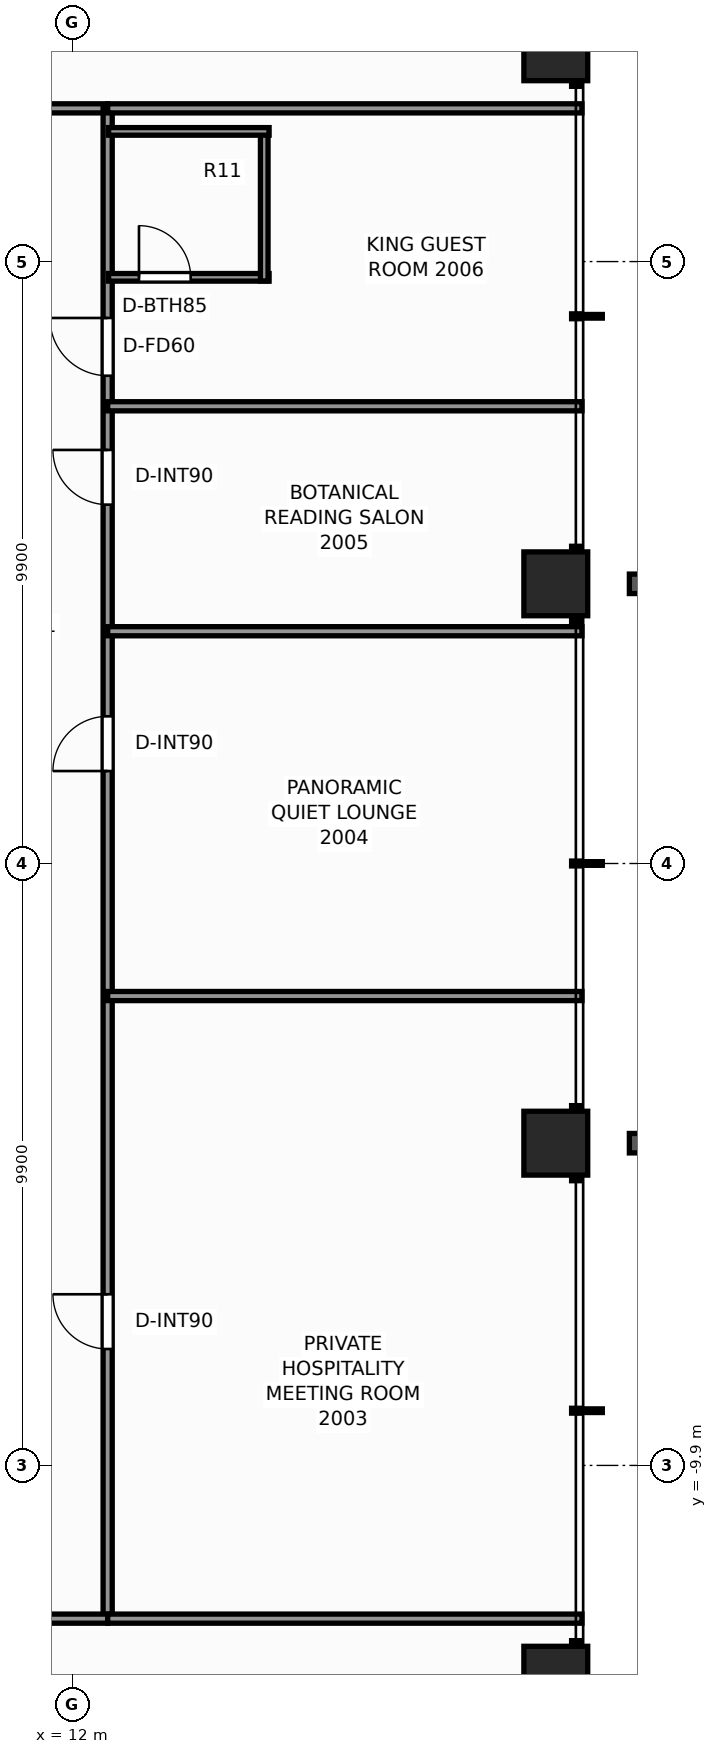
"""IFC4 building model, lengths in metres.
Left out: names, types, materials, properties, quantities, classifications, styles, units other than length and angle.
Written with IfcOpenShell. Run it as: python <this file> out.ifc"""

import sys

from ifc_helpers import new_model, si_unit, direction, frame, frame_2d, origin, origin_2d, place, context, subcontext, project, spatial, rectangle, extrude, element, fill, save


model = new_model("IFC4")
c1 = context("Model", 3, precision=1e-05, world=origin(), true_north=direction((0.0, 1.0)))
c2 = subcontext(c1, "Body", "Model", "MODEL_VIEW")
j1 = project(units=[si_unit("LENGTHUNIT", "METRE"), si_unit("PLANEANGLEUNIT", "RADIAN")], contexts=[c1])
p1 = place(None, origin())
s1 = spatial("IfcSite", under=j1, at=p1, CompositionType="ELEMENT")
p2 = place(p1, origin())
s2 = spatial("IfcBuilding", under=s1, at=p2, CompositionType="ELEMENT")
p3 = place(p2, frame((0.0, 0.0, 72.2)))
s3 = spatial("IfcBuildingStorey", under=s2, at=p3, CompositionType="ELEMENT", Elevation=72.2)
for number, where, z_axis, x_axis in (
    (1, (19.95, -13.4, 0.0), (0.0, 0.0, 1.0), (1.0, 0.0, 0.0)),
    (2, (19.95, -4.6, 0.0), (0.0, 0.0, 1.0), (1.0, 0.0, 0.0)),
    (3, (19.95, 4.6, 0.0), (0.0, 0.0, 1.0), (1.0, 0.0, 0.0)),
    (4, (19.95, 13.4, 0.0), (0.0, 0.0, 1.0), (1.0, 0.0, 0.0)),
):
    element("IfcColumn", number, at=place(p3, frame(where, z_axis=z_axis, x_axis=x_axis)), inside=s3, PredefinedType="COLUMN", context=c2, shape_type="SweptSolid", body=[
        extrude(rectangle(XDim=1.05, YDim=1.05, at=origin_2d()), origin(), (0.0, 0.0, 1.0), 3.3),
    ])
p4 = place(p3, frame((-12.42, 12.42, 0.0), z_axis=(0.0, 0.0, 1.0), x_axis=(1.0, 0.0, 0.0)))
e5 = element("IfcWall", 5, at=p4, inside=s3, PredefinedType="PARTITIONING", context=c2, shape_type="SweptSolid", body=[
    extrude(rectangle(XDim=25.0, YDim=0.15, at=frame_2d((12.5, 0.0))), origin(), (0.0, 0.0, 1.0), 2.292),
])
p5 = place(p4, frame((4.435, 0.0, 0.0)))
e6 = element("IfcOpeningElement", 6, at=p5, cuts=e5, PredefinedType="OPENING", context=c2, shape_type="SweptSolid", body=[
    extrude(rectangle(XDim=0.9, YDim=2.06, at=frame_2d((0.45, 1.03))), frame((0.0, 0.085, 0.0), z_axis=(0.0, -1.0, 0.0), x_axis=(1.0, 0.0, 0.0)), (0.0, 0.0, 1.0), 0.17),
])
p6 = place(p4, frame((19.505, 0.0, 0.0)))
e7 = element("IfcOpeningElement", 7, at=p6, cuts=e5, PredefinedType="OPENING", context=c2, shape_type="SweptSolid", body=[
    extrude(rectangle(XDim=0.9, YDim=2.06, at=frame_2d((0.45, 1.03))), frame((0.0, 0.085, 0.0), z_axis=(0.0, -1.0, 0.0), x_axis=(1.0, 0.0, 0.0)), (0.0, 0.0, 1.0), 0.17),
])
p7 = place(p3, frame((12.58, -12.42, 0.0), z_axis=(0.0, 0.0, 1.0), x_axis=(0.0, 1.0, 0.0)))
e8 = element("IfcWall", 8, at=p7, inside=s3, PredefinedType="PARTITIONING", context=c2, shape_type="SweptSolid", body=[
    extrude(rectangle(XDim=24.84, YDim=0.15, at=frame_2d((12.42, 0.0))), origin(), (0.0, 0.0, 1.0), 2.292),
])
p8 = place(p7, frame((4.435, 0.0, 0.0)))
e9 = element("IfcOpeningElement", 9, at=p8, cuts=e8, PredefinedType="OPENING", context=c2, shape_type="SweptSolid", body=[
    extrude(rectangle(XDim=0.9, YDim=2.06, at=frame_2d((0.45, 1.03))), frame((0.0, 0.085, 0.0), z_axis=(0.0, -1.0, 0.0), x_axis=(1.0, 0.0, 0.0)), (0.0, 0.0, 1.0), 0.17),
])
p9 = place(p7, frame((13.941, 0.0, 0.0)))
e10 = element("IfcOpeningElement", 10, at=p9, cuts=e8, PredefinedType="OPENING", context=c2, shape_type="SweptSolid", body=[
    extrude(rectangle(XDim=0.9, YDim=2.06, at=frame_2d((0.45, 1.03))), frame((0.0, 0.085, 0.0), z_axis=(0.0, -1.0, 0.0), x_axis=(1.0, 0.0, 0.0)), (0.0, 0.0, 1.0), 0.17),
])
p10 = place(p7, frame((18.322, 0.0, 0.0)))
e11 = element("IfcOpeningElement", 11, at=p10, cuts=e8, PredefinedType="OPENING", context=c2, shape_type="SweptSolid", body=[
    extrude(rectangle(XDim=0.9, YDim=2.06, at=frame_2d((0.45, 1.03))), frame((0.0, 0.085, 0.0), z_axis=(0.0, -1.0, 0.0), x_axis=(1.0, 0.0, 0.0)), (0.0, 0.0, 1.0), 0.17),
])
p11 = place(p7, frame((20.442, 0.0, 0.0)))
e12 = element("IfcOpeningElement", 12, at=p11, cuts=e8, PredefinedType="OPENING", context=c2, shape_type="SweptSolid", body=[
    extrude(rectangle(XDim=0.95, YDim=2.06, at=frame_2d((0.475, 1.03))), frame((0.0, 0.085, 0.0), z_axis=(0.0, -1.0, 0.0), x_axis=(1.0, 0.0, 0.0)), (0.0, 0.0, 1.0), 0.17),
])
p12 = place(p3, frame((-3.65, -12.42, 0.0), z_axis=(0.0, 0.0, 1.0), x_axis=(1.0, 0.0, 0.0)))
e13 = element("IfcWall", 13, at=p12, inside=s3, PredefinedType="PARTITIONING", context=c2, shape_type="SweptSolid", body=[
    extrude(rectangle(XDim=16.23, YDim=0.15, at=frame_2d((8.115, 0.0))), origin(), (0.0, 0.0, 1.0), 2.292),
])
p13 = place(p12, frame((0.666, 0.0, 0.0)))
e14 = element("IfcOpeningElement", 14, at=p13, cuts=e13, PredefinedType="OPENING", context=c2, shape_type="SweptSolid", body=[
    extrude(rectangle(XDim=0.9, YDim=2.06, at=frame_2d((0.45, 1.03))), frame((0.0, 0.085, 0.0), z_axis=(0.0, -1.0, 0.0), x_axis=(1.0, 0.0, 0.0)), (0.0, 0.0, 1.0), 0.17),
])
p14 = place(p12, frame((4.08, 0.0, 0.0)))
e15 = element("IfcOpeningElement", 15, at=p14, cuts=e13, PredefinedType="OPENING", context=c2, shape_type="SweptSolid", body=[
    extrude(rectangle(XDim=0.95, YDim=2.06, at=frame_2d((0.475, 1.03))), frame((0.0, 0.085, 0.0), z_axis=(0.0, -1.0, 0.0), x_axis=(1.0, 0.0, 0.0)), (0.0, 0.0, 1.0), 0.17),
])
p15 = place(p12, frame((10.735, 0.0, 0.0)))
e16 = element("IfcOpeningElement", 16, at=p15, cuts=e13, PredefinedType="OPENING", context=c2, shape_type="SweptSolid", body=[
    extrude(rectangle(XDim=0.9, YDim=2.06, at=frame_2d((0.45, 1.03))), frame((0.0, 0.085, 0.0), z_axis=(0.0, -1.0, 0.0), x_axis=(1.0, 0.0, 0.0)), (0.0, 0.0, 1.0), 0.17),
])
for number, where, z_axis, x_axis in (
    (17, (12.58, -12.42, 0.0), (0.0, 0.0, 1.0), (1.0, 0.0, 0.0)),
    (18, (12.58, 12.42, 0.0), (0.0, 0.0, 1.0), (1.0, 0.0, 0.0)),
):
    element("IfcWall", number, at=place(p3, frame(where, z_axis=z_axis, x_axis=x_axis)), inside=s3, PredefinedType="PARTITIONING", context=c2, shape_type="SweptSolid", body=[
        extrude(rectangle(XDim=7.8, YDim=0.15, at=frame_2d((3.9, 0.0))), origin(), (0.0, 0.0, 1.0), 2.292),
    ])
for number, where, z_axis, x_axis in (
    (19, (12.58, -2.18, 0.0), (0.0, 0.0, 1.0), (1.0, 0.0, 0.0)),
    (20, (12.58, 3.82, 0.0), (0.0, 0.0, 1.0), (1.0, 0.0, 0.0)),
    (21, (12.58, 7.52, 0.0), (0.0, 0.0, 1.0), (1.0, 0.0, 0.0)),
):
    element("IfcWall", number, at=place(p3, frame(where, z_axis=z_axis, x_axis=x_axis)), inside=s3, PredefinedType="PARTITIONING", context=c2, shape_type="SweptSolid", body=[
        extrude(rectangle(XDim=7.8, YDim=0.15, at=frame_2d((3.9, 0.0))), origin(), (0.0, 0.0, 1.0), 2.449),
    ])
p16 = place(p3, frame((12.595, 9.641, 0.0), z_axis=(0.0, 0.0, 1.0), x_axis=(1.0, 0.0, 0.0)))
e22 = element("IfcWall", 22, at=p16, inside=s3, PredefinedType="PARTITIONING", context=c2, shape_type="SweptSolid", body=[
    extrude(rectangle(XDim=2.64, YDim=0.125, at=frame_2d((1.32, 0.0))), origin(), (0.0, 0.0, 1.0), 3.08),
])
p17 = place(p16, frame((0.5, 0.0, 0.0)))
e23 = element("IfcOpeningElement", 23, at=p17, cuts=e22, PredefinedType="OPENING", context=c2, shape_type="SweptSolid", body=[
    extrude(rectangle(XDim=0.85, YDim=2.03, at=frame_2d((0.425, 1.015))), frame((0.0, 0.073, 0.0), z_axis=(0.0, -1.0, 0.0), x_axis=(1.0, 0.0, 0.0)), (0.0, 0.0, 1.0), 0.145),
])
p18 = place(p3, frame((15.155, 9.581, 0.0), z_axis=(0.0, 0.0, 1.0), x_axis=(0.0, 1.0, 0.0)))
e24 = element("IfcWall", 24, at=p18, inside=s3, PredefinedType="PARTITIONING", context=c2, shape_type="SweptSolid", body=[
    extrude(rectangle(XDim=2.52, YDim=0.125, at=frame_2d((1.26, 0.0))), origin(), (0.0, 0.0, 1.0), 2.292),
])
p19 = place(p3, frame((12.595, 12.041, 0.0), z_axis=(0.0, 0.0, 1.0), x_axis=(1.0, 0.0, 0.0)))
e25 = element("IfcWall", 25, at=p19, inside=s3, PredefinedType="PARTITIONING", context=c2, shape_type="SweptSolid", body=[
    extrude(rectangle(XDim=2.64, YDim=0.125, at=frame_2d((1.32, 0.0))), origin(), (0.0, 0.0, 1.0), 3.08),
])
p20 = place(p8, origin())
e26 = element("IfcDoor", 26, at=p20, inside=s3, OperationType="SINGLE_SWING_RIGHT", PredefinedType="DOOR", context=c2, shape_type="SweptSolid", body=[
    extrude(rectangle(XDim=0.9, YDim=2.06, at=frame_2d((0.45, 1.03))), frame((0.0, 0.025, 0.0), z_axis=(0.0, -1.0, 0.0), x_axis=(1.0, 0.0, 0.0)), (0.0, 0.0, 1.0), 0.05),
])
fill(e9, e26)
p21 = place(p9, origin())
e27 = element("IfcDoor", 27, at=p21, inside=s3, OperationType="SINGLE_SWING_LEFT", PredefinedType="DOOR", context=c2, shape_type="SweptSolid", body=[
    extrude(rectangle(XDim=0.9, YDim=2.06, at=frame_2d((0.45, 1.03))), frame((0.0, 0.025, 0.0), z_axis=(0.0, -1.0, 0.0), x_axis=(1.0, 0.0, 0.0)), (0.0, 0.0, 1.0), 0.05),
])
fill(e10, e27)
p22 = place(p10, origin())
e28 = element("IfcDoor", 28, at=p22, inside=s3, OperationType="SINGLE_SWING_RIGHT", PredefinedType="DOOR", context=c2, shape_type="SweptSolid", body=[
    extrude(rectangle(XDim=0.9, YDim=2.06, at=frame_2d((0.45, 1.03))), frame((0.0, 0.025, 0.0), z_axis=(0.0, -1.0, 0.0), x_axis=(1.0, 0.0, 0.0)), (0.0, 0.0, 1.0), 0.05),
])
fill(e11, e28)
p23 = place(p17, origin())
e29 = element("IfcDoor", 29, at=p23, inside=s3, OperationType="SINGLE_SWING_LEFT", PredefinedType="DOOR", context=c2, shape_type="SweptSolid", body=[
    extrude(rectangle(XDim=0.85, YDim=2.03, at=frame_2d((0.425, 1.015))), frame((0.0, 0.025, 0.0), z_axis=(0.0, -1.0, 0.0), x_axis=(1.0, 0.0, 0.0)), (0.0, 0.0, 1.0), 0.05),
])
fill(e23, e29)
p24 = place(p11, origin())
e30 = element("IfcDoor", 30, at=p24, inside=s3, OperationType="SINGLE_SWING_RIGHT", PredefinedType="DOOR", context=c2, shape_type="SweptSolid", body=[
    extrude(rectangle(XDim=0.95, YDim=2.06, at=frame_2d((0.475, 1.03))), frame((0.0, 0.025, 0.0), z_axis=(0.0, -1.0, 0.0), x_axis=(1.0, 0.0, 0.0)), (0.0, 0.0, 1.0), 0.05),
])
fill(e12, e30)
save(model, sys.argv[1])
